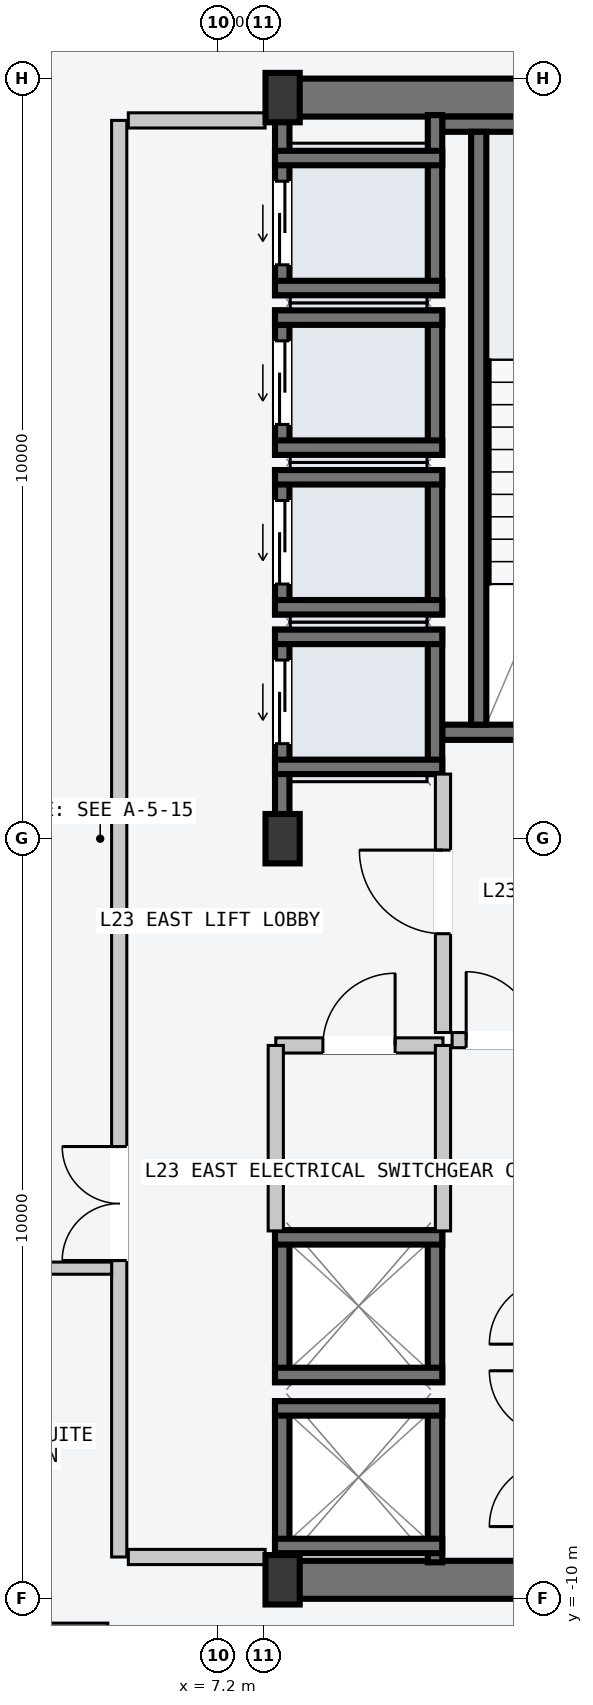
"""IFC4 building model, lengths in metres.
Left out: names, types, materials, properties, quantities, classifications, styles, units other than length and angle.
Written with IfcOpenShell. Run it as: python <this file> out.ifc"""

import sys

from ifc_helpers import new_model, si_unit, direction, frame, frame_2d, origin, origin_2d, place, context, subcontext, project, spatial, rectangle, i_section, extrude, element, fill, save


model = new_model("IFC4")
c1 = context("Model", 3, precision=1e-05, world=origin(), true_north=direction((0.0, 1.0)))
c2 = subcontext(c1, "Body", "Model", "MODEL_VIEW")
j1 = project(units=[si_unit("LENGTHUNIT", "METRE"), si_unit("PLANEANGLEUNIT", "RADIAN")], contexts=[c1])
p1 = place(None, origin())
s1 = spatial("IfcSite", under=j1, at=p1, CompositionType="ELEMENT")
p2 = place(p1, origin())
s2 = spatial("IfcBuilding", under=s1, at=p2, CompositionType="ELEMENT")
p3 = place(p2, frame((0.0, 0.0, 91.8)))
s3 = spatial("IfcBuildingStorey", under=s2, at=p3, CompositionType="ELEMENT", Elevation=91.8)
for number, where, z_axis, x_axis in (
    (1, (8.07, -9.75, -0.2), (0.0, 0.0, 1.0), (1.0, 0.0, 0.0)),
    (2, (8.07, 9.75, -0.2), (0.0, 0.0, 1.0), (1.0, 0.0, 0.0)),
):
    element("IfcWall", number, at=place(p3, frame(where, z_axis=z_axis, x_axis=x_axis)), inside=s3, PredefinedType="SHEAR", context=c2, shape_type="SweptSolid", body=[
        extrude(rectangle(XDim=6.46, YDim=0.5, at=frame_2d((3.23, 0.0))), origin(), (0.0, 0.0, 1.0), 3.6),
    ])
p4 = place(p3, frame((10.15, 1.4, -0.2), z_axis=(0.0, 0.0, 1.0), x_axis=(1.0, 0.0, 0.0)))
e3 = element("IfcWall", 3, at=p4, inside=s3, PredefinedType="SOLIDWALL", context=c2, shape_type="SweptSolid", body=[
    extrude(rectangle(XDim=4.1, YDim=0.2, at=frame_2d((2.05, 0.0))), origin(), (0.0, 0.0, 1.0), 3.6),
])
p5 = place(p4, frame((1.5, 0.0, 0.2)))
e4 = element("IfcOpeningElement", 4, at=p5, cuts=e3, PredefinedType="OPENING", context=c2, shape_type="SweptSolid", body=[
    extrude(rectangle(XDim=1.12, YDim=2.18, at=frame_2d((0.56, 1.09))), frame((0.0, 0.11, 0.0), z_axis=(0.0, -1.0, 0.0), x_axis=(1.0, 0.0, 0.0)), (0.0, 0.0, 1.0), 0.22),
])
p6 = place(p3, frame((10.15, 9.4, -0.2), z_axis=(0.0, 0.0, 1.0), x_axis=(1.0, 0.0, 0.0)))
e5 = element("IfcWall", 5, at=p6, inside=s3, PredefinedType="SOLIDWALL", context=c2, shape_type="SweptSolid", body=[
    extrude(rectangle(XDim=4.1, YDim=0.2, at=frame_2d((2.05, 0.0))), origin(), (0.0, 0.0, 1.0), 3.6),
])
p7 = place(p3, frame((10.63, 1.5, -0.2), z_axis=(0.0, 0.0, 1.0), x_axis=(0.0, 1.0, 0.0)))
e6 = element("IfcWall", 6, at=p7, inside=s3, PredefinedType="SOLIDWALL", context=c2, shape_type="SweptSolid", body=[
    extrude(rectangle(XDim=7.8, YDim=0.2, at=frame_2d((3.9, 0.0))), origin(), (0.0, 0.0, 1.0), 3.6),
])
for number, where, z_axis, x_axis in (
    (7, (8.05, -9.75, 0.0), (0.0, 0.0, 1.0), (1.0, 0.0, 0.0)),
    (8, (8.05, 0.0, 0.0), (0.0, 0.0, 1.0), (1.0, 0.0, 0.0)),
    (9, (8.05, 9.75, 0.0), (0.0, 0.0, 1.0), (1.0, 0.0, 0.0)),
):
    element("IfcColumn", number, at=place(p3, frame(where, z_axis=z_axis, x_axis=x_axis)), inside=s3, PredefinedType="COLUMN", context=c2, shape_type="SweptSolid", body=[
        extrude(i_section(OverallWidth=0.45, OverallDepth=0.65, WebThickness=0.025, FlangeThickness=0.04, at=origin_2d()), origin(), (0.0, 0.0, 1.0), 3.6),
    ])
p8 = place(p3, frame((8.045, 0.21, -0.2), z_axis=(0.0, 0.0, 1.0), x_axis=(0.0, 1.0, 0.0)))
e10 = element("IfcWall", 10, at=p8, inside=s3, PredefinedType="SOLIDWALL", context=c2, shape_type="SweptSolid", body=[
    extrude(rectangle(XDim=2.54, YDim=0.19, at=frame_2d((1.27, 0.0))), origin(), (0.0, 0.0, 1.0), 3.6),
])
p9 = place(p8, frame((1.04, 0.0, 0.2)))
e11 = element("IfcOpeningElement", 11, at=p9, cuts=e10, PredefinedType="OPENING", context=c2, shape_type="SweptSolid", body=[
    extrude(rectangle(XDim=1.1, YDim=2.2, at=frame_2d((0.55, 1.1))), frame((0.0, 0.105, 0.0), z_axis=(0.0, -1.0, 0.0), x_axis=(1.0, 0.0, 0.0)), (0.0, 0.0, 1.0), 0.21),
])
p10 = place(p3, frame((10.055, 0.85, -0.2), z_axis=(0.0, 0.0, 1.0), x_axis=(0.0, 1.0, 0.0)))
e12 = element("IfcWall", 12, at=p10, inside=s3, PredefinedType="SOLIDWALL", context=c2, shape_type="SweptSolid", body=[
    extrude(rectangle(XDim=1.9, YDim=0.19, at=frame_2d((0.95, 0.0))), origin(), (0.0, 0.0, 1.0), 3.6),
])
for number, where, z_axis, x_axis in (
    (13, (7.95, 2.655, -0.2), (0.0, 0.0, 1.0), (1.0, 0.0, 0.0)),
    (14, (7.95, 0.945, -0.2), (0.0, 0.0, 1.0), (1.0, 0.0, 0.0)),
):
    element("IfcWall", number, at=place(p3, frame(where, z_axis=z_axis, x_axis=x_axis)), inside=s3, PredefinedType="SOLIDWALL", context=c2, shape_type="SweptSolid", body=[
        extrude(rectangle(XDim=2.2, YDim=0.19, at=frame_2d((1.1, 0.0))), origin(), (0.0, 0.0, 1.0), 3.6),
    ])
p11 = place(p3, frame((8.045, 2.95, -0.2), z_axis=(0.0, 0.0, 1.0), x_axis=(0.0, 1.0, 0.0)))
e15 = element("IfcWall", 15, at=p11, inside=s3, PredefinedType="SOLIDWALL", context=c2, shape_type="SweptSolid", body=[
    extrude(rectangle(XDim=1.9, YDim=0.19, at=frame_2d((0.95, 0.0))), origin(), (0.0, 0.0, 1.0), 3.6),
])
p12 = place(p11, frame((0.4, 0.0, 0.2)))
e16 = element("IfcOpeningElement", 16, at=p12, cuts=e15, PredefinedType="OPENING", context=c2, shape_type="SweptSolid", body=[
    extrude(rectangle(XDim=1.1, YDim=2.2, at=frame_2d((0.55, 1.1))), frame((0.0, 0.105, 0.0), z_axis=(0.0, -1.0, 0.0), x_axis=(1.0, 0.0, 0.0)), (0.0, 0.0, 1.0), 0.21),
])
p13 = place(p3, frame((10.055, 2.95, -0.2), z_axis=(0.0, 0.0, 1.0), x_axis=(0.0, 1.0, 0.0)))
e17 = element("IfcWall", 17, at=p13, inside=s3, PredefinedType="SOLIDWALL", context=c2, shape_type="SweptSolid", body=[
    extrude(rectangle(XDim=1.9, YDim=0.19, at=frame_2d((0.95, 0.0))), origin(), (0.0, 0.0, 1.0), 3.6),
])
for number, where, z_axis, x_axis in (
    (18, (7.95, 4.755, -0.2), (0.0, 0.0, 1.0), (1.0, 0.0, 0.0)),
    (19, (7.95, 3.045, -0.2), (0.0, 0.0, 1.0), (1.0, 0.0, 0.0)),
):
    element("IfcWall", number, at=place(p3, frame(where, z_axis=z_axis, x_axis=x_axis)), inside=s3, PredefinedType="SOLIDWALL", context=c2, shape_type="SweptSolid", body=[
        extrude(rectangle(XDim=2.2, YDim=0.19, at=frame_2d((1.1, 0.0))), origin(), (0.0, 0.0, 1.0), 3.6),
    ])
p14 = place(p3, frame((8.045, 5.05, -0.2), z_axis=(0.0, 0.0, 1.0), x_axis=(0.0, 1.0, 0.0)))
e20 = element("IfcWall", 20, at=p14, inside=s3, PredefinedType="SOLIDWALL", context=c2, shape_type="SweptSolid", body=[
    extrude(rectangle(XDim=1.9, YDim=0.19, at=frame_2d((0.95, 0.0))), origin(), (0.0, 0.0, 1.0), 3.6),
])
p15 = place(p14, frame((0.4, 0.0, 0.2)))
e21 = element("IfcOpeningElement", 21, at=p15, cuts=e20, PredefinedType="OPENING", context=c2, shape_type="SweptSolid", body=[
    extrude(rectangle(XDim=1.1, YDim=2.2, at=frame_2d((0.55, 1.1))), frame((0.0, 0.105, 0.0), z_axis=(0.0, -1.0, 0.0), x_axis=(1.0, 0.0, 0.0)), (0.0, 0.0, 1.0), 0.21),
])
p16 = place(p3, frame((10.055, 5.05, -0.2), z_axis=(0.0, 0.0, 1.0), x_axis=(0.0, 1.0, 0.0)))
e22 = element("IfcWall", 22, at=p16, inside=s3, PredefinedType="SOLIDWALL", context=c2, shape_type="SweptSolid", body=[
    extrude(rectangle(XDim=1.9, YDim=0.19, at=frame_2d((0.95, 0.0))), origin(), (0.0, 0.0, 1.0), 3.6),
])
for number, where, z_axis, x_axis in (
    (23, (7.95, 6.855, -0.2), (0.0, 0.0, 1.0), (1.0, 0.0, 0.0)),
    (24, (7.95, 5.145, -0.2), (0.0, 0.0, 1.0), (1.0, 0.0, 0.0)),
):
    element("IfcWall", number, at=place(p3, frame(where, z_axis=z_axis, x_axis=x_axis)), inside=s3, PredefinedType="SOLIDWALL", context=c2, shape_type="SweptSolid", body=[
        extrude(rectangle(XDim=2.2, YDim=0.19, at=frame_2d((1.1, 0.0))), origin(), (0.0, 0.0, 1.0), 3.6),
    ])
p17 = place(p3, frame((8.045, 7.15, -0.2), z_axis=(0.0, 0.0, 1.0), x_axis=(0.0, 1.0, 0.0)))
e25 = element("IfcWall", 25, at=p17, inside=s3, PredefinedType="SOLIDWALL", context=c2, shape_type="SweptSolid", body=[
    extrude(rectangle(XDim=2.37, YDim=0.19, at=frame_2d((1.185, 0.0))), origin(), (0.0, 0.0, 1.0), 3.6),
])
p18 = place(p17, frame((0.4, 0.0, 0.2)))
e26 = element("IfcOpeningElement", 26, at=p18, cuts=e25, PredefinedType="OPENING", context=c2, shape_type="SweptSolid", body=[
    extrude(rectangle(XDim=1.1, YDim=2.2, at=frame_2d((0.55, 1.1))), frame((0.0, 0.105, 0.0), z_axis=(0.0, -1.0, 0.0), x_axis=(1.0, 0.0, 0.0)), (0.0, 0.0, 1.0), 0.21),
])
p19 = place(p3, frame((10.055, 7.15, -0.2), z_axis=(0.0, 0.0, 1.0), x_axis=(0.0, 1.0, 0.0)))
e27 = element("IfcWall", 27, at=p19, inside=s3, PredefinedType="SOLIDWALL", context=c2, shape_type="SweptSolid", body=[
    extrude(rectangle(XDim=2.37, YDim=0.19, at=frame_2d((1.185, 0.0))), origin(), (0.0, 0.0, 1.0), 3.6),
])
for number, where, z_axis, x_axis in (
    (28, (7.95, 8.955, -0.2), (0.0, 0.0, 1.0), (1.0, 0.0, 0.0)),
    (29, (7.95, 7.245, -0.2), (0.0, 0.0, 1.0), (1.0, 0.0, 0.0)),
):
    element("IfcWall", number, at=place(p3, frame(where, z_axis=z_axis, x_axis=x_axis)), inside=s3, PredefinedType="SOLIDWALL", context=c2, shape_type="SweptSolid", body=[
        extrude(rectangle(XDim=2.2, YDim=0.19, at=frame_2d((1.1, 0.0))), origin(), (0.0, 0.0, 1.0), 3.6),
    ])
for number, where, z_axis, x_axis in (
    (30, (8.045, -9.52, -0.2), (0.0, 0.0, 1.0), (0.0, 1.0, 0.0)),
    (31, (10.055, -9.52, -0.2), (0.0, 0.0, 1.0), (0.0, 1.0, 0.0)),
):
    element("IfcWall", number, at=place(p3, frame(where, z_axis=z_axis, x_axis=x_axis)), inside=s3, PredefinedType="SOLIDWALL", context=c2, shape_type="SweptSolid", body=[
        extrude(rectangle(XDim=2.12, YDim=0.19, at=frame_2d((1.06, 0.0))), origin(), (0.0, 0.0, 1.0), 3.6),
    ])
for number, where, z_axis, x_axis in (
    (32, (7.95, -7.495, -0.2), (0.0, 0.0, 1.0), (1.0, 0.0, 0.0)),
    (33, (7.95, -9.305, -0.2), (0.0, 0.0, 1.0), (1.0, 0.0, 0.0)),
):
    element("IfcWall", number, at=place(p3, frame(where, z_axis=z_axis, x_axis=x_axis)), inside=s3, PredefinedType="SOLIDWALL", context=c2, shape_type="SweptSolid", body=[
        extrude(rectangle(XDim=2.2, YDim=0.19, at=frame_2d((1.1, 0.0))), origin(), (0.0, 0.0, 1.0), 3.6),
    ])
for number, where, z_axis, x_axis in (
    (34, (8.045, -7.15, -0.2), (0.0, 0.0, 1.0), (0.0, 1.0, 0.0)),
    (35, (10.055, -7.15, -0.2), (0.0, 0.0, 1.0), (0.0, 1.0, 0.0)),
):
    element("IfcWall", number, at=place(p3, frame(where, z_axis=z_axis, x_axis=x_axis)), inside=s3, PredefinedType="SOLIDWALL", context=c2, shape_type="SweptSolid", body=[
        extrude(rectangle(XDim=2.0, YDim=0.19, at=frame_2d((1.0, 0.0))), origin(), (0.0, 0.0, 1.0), 3.6),
    ])
for number, where, z_axis, x_axis in (
    (36, (7.95, -5.245, -0.2), (0.0, 0.0, 1.0), (1.0, 0.0, 0.0)),
    (37, (7.95, -7.055, -0.2), (0.0, 0.0, 1.0), (1.0, 0.0, 0.0)),
):
    element("IfcWall", number, at=place(p3, frame(where, z_axis=z_axis, x_axis=x_axis)), inside=s3, PredefinedType="SOLIDWALL", context=c2, shape_type="SweptSolid", body=[
        extrude(rectangle(XDim=2.2, YDim=0.19, at=frame_2d((1.1, 0.0))), origin(), (0.0, 0.0, 1.0), 3.6),
    ])
p20 = place(p3, frame((5.9, -9.45, 0.0), z_axis=(0.0, 0.0, 1.0), x_axis=(0.0, 1.0, 0.0)))
e38 = element("IfcWall", 38, at=p20, inside=s3, PredefinedType="PARTITIONING", context=c2, shape_type="SweptSolid", body=[
    extrude(rectangle(XDim=18.9, YDim=0.2, at=frame_2d((9.45, 0.0))), origin(), (0.0, 0.0, 1.0), 3.4),
])
p21 = place(p20, frame((3.9, 0.0, 0.0)))
e39 = element("IfcOpeningElement", 39, at=p21, cuts=e38, PredefinedType="OPENING", context=c2, shape_type="SweptSolid", body=[
    extrude(rectangle(XDim=1.5, YDim=2.2, at=frame_2d((0.75, 1.1))), frame((0.0, 0.11, 0.0), z_axis=(0.0, -1.0, 0.0), x_axis=(1.0, 0.0, 0.0)), (0.0, 0.0, 1.0), 0.22),
])
for number, where, z_axis, x_axis in (
    (40, (6.02, -9.45, 0.0), (0.0, 0.0, 1.0), (1.0, 0.0, 0.0)),
    (41, (6.02, 9.45, 0.0), (0.0, 0.0, 1.0), (1.0, 0.0, 0.0)),
):
    element("IfcWall", number, at=place(p3, frame(where, z_axis=z_axis, x_axis=x_axis)), inside=s3, PredefinedType="PARTITIONING", context=c2, shape_type="SweptSolid", body=[
        extrude(rectangle(XDim=1.8, YDim=0.2, at=frame_2d((0.9, 0.0))), origin(), (0.0, 0.0, 1.0), 3.4),
    ])
p22 = place(p3, frame((10.16, -2.55, 0.0), z_axis=(0.0, 0.0, 1.0), x_axis=(0.0, 1.0, 0.0)))
e42 = element("IfcWall", 42, at=p22, inside=s3, PredefinedType="PARTITIONING", context=c2, shape_type="SweptSolid", body=[
    extrude(rectangle(XDim=3.4, YDim=0.2, at=frame_2d((1.7, 0.0))), origin(), (0.0, 0.0, 1.0), 3.4),
])
p23 = place(p22, frame((1.3, 0.0, 0.0)))
e43 = element("IfcOpeningElement", 43, at=p23, cuts=e42, PredefinedType="OPENING", context=c2, shape_type="SweptSolid", body=[
    extrude(rectangle(XDim=1.1, YDim=2.15, at=frame_2d((0.55, 1.075))), frame((0.0, 0.11, 0.0), z_axis=(0.0, -1.0, 0.0), x_axis=(1.0, 0.0, 0.0)), (0.0, 0.0, 1.0), 0.22),
])
p24 = place(p3, frame((10.28, -2.65, 0.0), z_axis=(0.0, 0.0, 1.0), x_axis=(1.0, 0.0, 0.0)))
e44 = element("IfcWall", 44, at=p24, inside=s3, PredefinedType="PARTITIONING", context=c2, shape_type="SweptSolid", body=[
    extrude(rectangle(XDim=1.27, YDim=0.2, at=frame_2d((0.635, 0.0))), origin(), (0.0, 0.0, 1.0), 3.4),
])
p25 = place(p24, frame((0.185, 0.0, 0.0)))
e45 = element("IfcOpeningElement", 45, at=p25, cuts=e44, PredefinedType="OPENING", context=c2, shape_type="SweptSolid", body=[
    extrude(rectangle(XDim=0.9, YDim=2.15, at=frame_2d((0.45, 1.075))), frame((0.0, 0.11, 0.0), z_axis=(0.0, -1.0, 0.0), x_axis=(1.0, 0.0, 0.0)), (0.0, 0.0, 1.0), 0.22),
])
p26 = place(p3, frame((7.96, -2.72, 0.0), z_axis=(0.0, 0.0, 1.0), x_axis=(1.0, 0.0, 0.0)))
e46 = element("IfcWall", 46, at=p26, inside=s3, PredefinedType="PARTITIONING", context=c2, shape_type="SweptSolid", body=[
    extrude(rectangle(XDim=2.2, YDim=0.2, at=frame_2d((1.1, 0.0))), origin(), (0.0, 0.0, 1.0), 3.4),
])
p27 = place(p26, frame((0.62, 0.0, 0.0)))
e47 = element("IfcOpeningElement", 47, at=p27, cuts=e46, PredefinedType="OPENING", context=c2, shape_type="SweptSolid", body=[
    extrude(rectangle(XDim=0.95, YDim=2.1, at=frame_2d((0.475, 1.05))), frame((0.0, 0.11, 0.0), z_axis=(0.0, -1.0, 0.0), x_axis=(1.0, 0.0, 0.0)), (0.0, 0.0, 1.0), 0.22),
])
for number, where, z_axis, x_axis in (
    (48, (7.96, -5.16, 0.0), (0.0, 0.0, 1.0), (0.0, 1.0, 0.0)),
    (49, (10.16, -5.16, 0.0), (0.0, 0.0, 1.0), (0.0, 1.0, 0.0)),
):
    element("IfcWall", number, at=place(p3, frame(where, z_axis=z_axis, x_axis=x_axis)), inside=s3, PredefinedType="PARTITIONING", context=c2, shape_type="SweptSolid", body=[
        extrude(rectangle(XDim=2.44, YDim=0.2, at=frame_2d((1.22, 0.0))), origin(), (0.0, 0.0, 1.0), 3.4),
    ])
p28 = place(p3, frame((-5.8, -5.65, 0.0), z_axis=(0.0, 0.0, 1.0), x_axis=(1.0, 0.0, 0.0)))
e50 = element("IfcWall", 50, at=p28, inside=s3, PredefinedType="PARTITIONING", context=c2, shape_type="SweptSolid", body=[
    extrude(rectangle(XDim=11.6, YDim=0.16, at=frame_2d((5.8, 0.0))), origin(), (0.0, 0.0, 1.0), 3.4),
])
p29 = place(p28, frame((5.1, 0.0, 0.0)))
e51 = element("IfcOpeningElement", 51, at=p29, cuts=e50, PredefinedType="OPENING", context=c2, shape_type="SweptSolid", body=[
    extrude(rectangle(XDim=1.4, YDim=2.2, at=frame_2d((0.7, 1.1))), frame((0.0, 0.09, 0.0), z_axis=(0.0, -1.0, 0.0), x_axis=(1.0, 0.0, 0.0)), (0.0, 0.0, 1.0), 0.18),
])
p30 = place(p3, frame((-5.75, -10.4, 0.0), z_axis=(0.0, 0.0, 1.0), x_axis=(1.0, 0.0, 0.0)))
e52 = element("IfcWall", 52, at=p30, inside=s3, PredefinedType="PARTITIONING", context=c2, shape_type="SweptSolid", body=[
    extrude(rectangle(XDim=11.5, YDim=0.16, at=frame_2d((5.75, 0.0))), origin(), (0.0, 0.0, 1.0), 3.4),
])
p31 = place(p30, frame((5.05, 0.0, 0.0)))
e53 = element("IfcOpeningElement", 53, at=p31, cuts=e52, PredefinedType="OPENING", context=c2, shape_type="SweptSolid", body=[
    extrude(rectangle(XDim=1.4, YDim=2.2, at=frame_2d((0.7, 1.1))), frame((0.0, 0.09, 0.0), z_axis=(0.0, -1.0, 0.0), x_axis=(1.0, 0.0, 0.0)), (0.0, 0.0, 1.0), 0.18),
])
p32 = place(p9, origin())
e54 = element("IfcDoor", 54, at=p32, inside=s3, OperationType="SLIDING_TO_LEFT", PredefinedType="DOOR", context=c2, shape_type="SweptSolid", body=[
    extrude(rectangle(XDim=1.1, YDim=2.2, at=frame_2d((0.55, 1.1))), frame((0.0, 0.025, 0.0), z_axis=(0.0, -1.0, 0.0), x_axis=(1.0, 0.0, 0.0)), (0.0, 0.0, 1.0), 0.05),
])
fill(e11, e54)
p33 = place(p12, origin())
e55 = element("IfcDoor", 55, at=p33, inside=s3, OperationType="SLIDING_TO_LEFT", PredefinedType="DOOR", context=c2, shape_type="SweptSolid", body=[
    extrude(rectangle(XDim=1.1, YDim=2.2, at=frame_2d((0.55, 1.1))), frame((0.0, 0.025, 0.0), z_axis=(0.0, -1.0, 0.0), x_axis=(1.0, 0.0, 0.0)), (0.0, 0.0, 1.0), 0.05),
])
fill(e16, e55)
p34 = place(p15, origin())
e56 = element("IfcDoor", 56, at=p34, inside=s3, OperationType="SLIDING_TO_LEFT", PredefinedType="DOOR", context=c2, shape_type="SweptSolid", body=[
    extrude(rectangle(XDim=1.1, YDim=2.2, at=frame_2d((0.55, 1.1))), frame((0.0, 0.025, 0.0), z_axis=(0.0, -1.0, 0.0), x_axis=(1.0, 0.0, 0.0)), (0.0, 0.0, 1.0), 0.05),
])
fill(e21, e56)
p35 = place(p18, origin())
e57 = element("IfcDoor", 57, at=p35, inside=s3, OperationType="SLIDING_TO_LEFT", PredefinedType="DOOR", context=c2, shape_type="SweptSolid", body=[
    extrude(rectangle(XDim=1.1, YDim=2.2, at=frame_2d((0.55, 1.1))), frame((0.0, 0.025, 0.0), z_axis=(0.0, -1.0, 0.0), x_axis=(1.0, 0.0, 0.0)), (0.0, 0.0, 1.0), 0.05),
])
fill(e26, e57)
p36 = place(p21, origin())
e58 = element("IfcDoor", 58, at=p36, inside=s3, OperationType="DOUBLE_DOOR_SINGLE_SWING", PredefinedType="DOOR", context=c2, shape_type="SweptSolid", body=[
    extrude(rectangle(XDim=1.5, YDim=2.2, at=frame_2d((0.75, 1.1))), frame((0.0, 0.025, 0.0), z_axis=(0.0, -1.0, 0.0), x_axis=(1.0, 0.0, 0.0)), (0.0, 0.0, 1.0), 0.05),
])
fill(e39, e58)
p37 = place(p23, origin())
e59 = element("IfcDoor", 59, at=p37, inside=s3, OperationType="SINGLE_SWING_RIGHT", PredefinedType="DOOR", context=c2, shape_type="SweptSolid", body=[
    extrude(rectangle(XDim=1.1, YDim=2.15, at=frame_2d((0.55, 1.075))), frame((0.0, 0.025, 0.0), z_axis=(0.0, -1.0, 0.0), x_axis=(1.0, 0.0, 0.0)), (0.0, 0.0, 1.0), 0.05),
])
fill(e43, e59)
p38 = place(p25, origin())
e60 = element("IfcDoor", 60, at=p38, inside=s3, OperationType="SINGLE_SWING_LEFT", PredefinedType="DOOR", context=c2, shape_type="SweptSolid", body=[
    extrude(rectangle(XDim=0.9, YDim=2.15, at=frame_2d((0.45, 1.075))), frame((0.0, 0.025, 0.0), z_axis=(0.0, -1.0, 0.0), x_axis=(1.0, 0.0, 0.0)), (0.0, 0.0, 1.0), 0.05),
])
fill(e45, e60)
p39 = place(p27, origin())
e61 = element("IfcDoor", 61, at=p39, inside=s3, OperationType="SINGLE_SWING_RIGHT", PredefinedType="DOOR", context=c2, shape_type="SweptSolid", body=[
    extrude(rectangle(XDim=0.95, YDim=2.1, at=frame_2d((0.475, 1.05))), frame((0.0, 0.025, 0.0), z_axis=(0.0, -1.0, 0.0), x_axis=(1.0, 0.0, 0.0)), (0.0, 0.0, 1.0), 0.05),
])
fill(e47, e61)
save(model, sys.argv[1])
